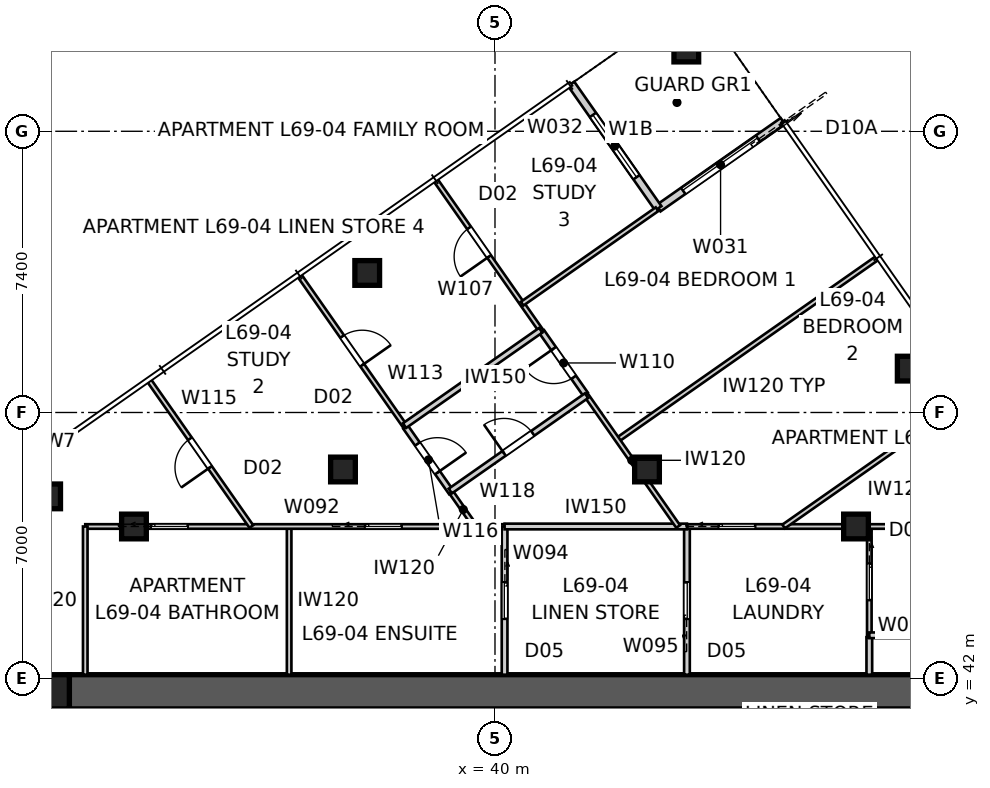
"""IFC4 building model, lengths in metres.
Left out: names, types, materials, properties, quantities, classifications, styles, units other than length and angle.
Written with IfcOpenShell. Run it as: python <this file> out.ifc"""

import sys

from ifc_helpers import new_model, si_unit, direction, frame, frame_2d, origin, origin_2d, place, context, subcontext, project, spatial, polyline, rectangle, outline, extrude, element, fill, save


model = new_model("IFC4")
c1 = context("Model", 3, precision=1e-05, world=origin(), true_north=direction((0.0, 1.0)))
c2 = subcontext(c1, "Body", "Model", "MODEL_VIEW")
j1 = project(units=[si_unit("LENGTHUNIT", "METRE"), si_unit("PLANEANGLEUNIT", "RADIAN")], contexts=[c1])
p1 = place(None, origin())
s1 = spatial("IfcSite", under=j1, at=p1, CompositionType="ELEMENT")
p2 = place(p1, origin())
s2 = spatial("IfcBuilding", under=s1, at=p2, CompositionType="ELEMENT")
p3 = place(p2, frame((0.0, 0.0, 250.6)))
s3 = spatial("IfcBuildingStorey", under=s2, at=p3, CompositionType="ELEMENT", Elevation=250.6)
p4 = place(p3, frame((28.8, 41.65, 0.0), z_axis=(0.0, 0.0, 1.0), x_axis=(1.0, 0.0, 0.0)))
e1 = element("IfcWall", 1, at=p4, inside=s3, PredefinedType="SHEAR", context=c2, shape_type="SweptSolid", body=[
    extrude(outline(polyline([(0.0, -0.45), (22.4, -0.45), (22.4, -0.025), (22.85, -0.025), (22.85, 0.025), (22.4, 0.025), (22.4, 0.45), (0.0, 0.45), (0.0, 0.025), (-0.45, 0.025), (-0.45, -0.025), (0.0, -0.025), (0.0, -0.45)])), origin(), (0.0, 0.0, 1.0), 3.4),
])
p5 = place(p3, frame((28.35, 41.2, 0.0), z_axis=(0.0, 0.0, 1.0), x_axis=(0.0, -1.0, 0.0)))
e2 = element("IfcWall", 2, at=p5, inside=s3, PredefinedType="SHEAR", context=c2, shape_type="SweptSolid", body=[
    extrude(outline(polyline([(0.0, -0.45), (22.4, -0.45), (22.4, -0.025), (22.85, -0.025), (22.85, 0.025), (22.4, 0.025), (22.4, 0.45), (0.0, 0.45), (0.0, 0.025), (-0.45, 0.025), (-0.45, -0.025), (0.0, -0.025), (0.0, -0.45)])), origin(), (0.0, 0.0, 1.0), 3.4),
])
p6 = place(p5, frame((11.14, 0.0, 0.0)))
e3 = element("IfcOpeningElement", 3, at=p6, cuts=e2, PredefinedType="OPENING", context=c2, shape_type="SweptSolid", body=[
    extrude(rectangle(XDim=1.02, YDim=2.4, at=frame_2d((0.51, 1.2))), frame((0.0, 0.46, 0.0), z_axis=(0.0, -1.0, 0.0), x_axis=(1.0, 0.0, 0.0)), (0.0, 0.0, 1.0), 0.92),
])
p7 = place(p3, frame((28.35, 41.65, 0.0), z_axis=(0.0, 0.0, 1.0), x_axis=(1.0, 0.0, 0.0)))
e4 = element("IfcColumn", 4, at=p7, inside=s3, PredefinedType="COLUMN", context=c2, shape_type="SweptSolid", body=[
    extrude(rectangle(XDim=0.9, YDim=0.9, at=origin_2d()), origin(), (0.0, 0.0, 1.0), 3.4),
])
for number, where, z_axis, x_axis in (
    (5, (50.914, 50.155, 0.0), (0.0, 0.0, 1.0), (1.0, 0.0, 0.0)),
    (6, (45.034, 58.551, 0.0), (0.0, 0.0, 1.0), (1.0, 0.0, 0.0)),
    (7, (36.638, 52.672, 0.0), (0.0, 0.0, 1.0), (1.0, 0.0, 0.0)),
    (8, (28.242, 46.793, 0.0), (0.0, 0.0, 1.0), (1.0, 0.0, 0.0)),
    (9, (49.5, 46.0, 0.0), (0.0, 0.0, 1.0), (1.0, 0.0, 0.0)),
    (10, (44.0, 47.5, 0.0), (0.0, 0.0, 1.0), (1.0, 0.0, 0.0)),
    (11, (36.0, 47.5, 0.0), (0.0, 0.0, 1.0), (1.0, 0.0, 0.0)),
    (12, (30.5, 46.0, 0.0), (0.0, 0.0, 1.0), (1.0, 0.0, 0.0)),
):
    element("IfcColumn", number, at=place(p3, frame(where, z_axis=z_axis, x_axis=x_axis)), inside=s3, PredefinedType="COLUMN", context=c2, shape_type="SweptSolid", body=[
        extrude(rectangle(XDim=0.65, YDim=0.65, at=origin_2d()), origin(), (0.0, 0.0, 1.0), 3.4),
    ])
p8 = place(p3, frame((47.574, 56.667, 0.0), z_axis=(0.0, 0.0, 1.0), x_axis=(-0.819165963305, -0.573556557423, 0.0)))
e13 = element("IfcWall", 13, at=p8, inside=s3, PredefinedType="SOLIDWALL", context=c2, shape_type="SweptSolid", body=[
    extrude(rectangle(XDim=4.0, YDim=0.2, at=frame_2d((2.0, 0.0))), origin(), (0.0, 0.0, 1.0), 3.25),
])
p9 = place(p8, frame((0.8, 0.0, 0.0)))
e14 = element("IfcOpeningElement", 14, at=p9, cuts=e13, PredefinedType="OPENING", context=c2, shape_type="SweptSolid", body=[
    extrude(rectangle(XDim=2.4, YDim=2.1, at=frame_2d((1.2, 1.05))), frame((0.0, 0.11, 0.0), z_axis=(0.0, -1.0, 0.0), x_axis=(1.0, 0.0, 0.0)), (0.0, 0.0, 1.0), 0.22),
])
p10 = place(p3, frame((44.298, 54.373, 0.0), z_axis=(0.0, 0.0, 1.0), x_axis=(-0.573597512525, 0.819137286189, 0.0)))
e15 = element("IfcWall", 15, at=p10, inside=s3, PredefinedType="SOLIDWALL", context=c2, shape_type="SweptSolid", body=[
    extrude(rectangle(XDim=4.0, YDim=0.2, at=frame_2d((2.0, 0.0))), origin(), (0.0, 0.0, 1.0), 3.25),
])
p11 = place(p10, frame((1.0, 0.0, 0.45)))
e16 = element("IfcOpeningElement", 16, at=p11, cuts=e15, PredefinedType="OPENING", context=c2, shape_type="SweptSolid", body=[
    extrude(rectangle(XDim=2.0, YDim=1.8, at=frame_2d((1.0, 0.9))), frame((0.0, 0.11, 0.0), z_axis=(0.0, -1.0, 0.0), x_axis=(1.0, 0.0, 0.0)), (0.0, 0.0, 1.0), 0.22),
])
p12 = place(p3, frame((34.583, 46.0, 0.0), z_axis=(0.0, 0.0, 1.0), x_axis=(0.0, -1.0, 0.0)))
e17 = element("IfcWall", 17, at=p12, inside=s3, PredefinedType="PARTITIONING", context=c2, shape_type="SweptSolid", body=[
    extrude(rectangle(XDim=3.9, YDim=0.12, at=frame_2d((1.95, 0.0))), origin(), (0.0, 0.0, 1.0), 3.25),
])
p13 = place(p3, frame((29.219, 46.0, 0.0), z_axis=(0.0, 0.0, 1.0), x_axis=(1.0, 0.0, 0.0)))
e18 = element("IfcWall", 18, at=p13, inside=s3, PredefinedType="PARTITIONING", context=c2, shape_type="SweptSolid", body=[
    extrude(rectangle(XDim=11.034, YDim=0.12, at=frame_2d((5.517, 0.0))), origin(), (0.0, 0.0, 1.0), 2.55),
])
p14 = place(p13, frame((1.735, 0.0, 0.0)))
e19 = element("IfcOpeningElement", 19, at=p14, cuts=e18, PredefinedType="OPENING", context=c2, shape_type="SweptSolid", body=[
    extrude(rectangle(XDim=0.96, YDim=2.1, at=frame_2d((0.48, 1.05))), frame((0.0, 0.07, 0.0), z_axis=(0.0, -1.0, 0.0), x_axis=(1.0, 0.0, 0.0)), (0.0, 0.0, 1.0), 0.14),
])
p15 = place(p13, frame((7.363, 0.0, 0.0)))
e20 = element("IfcOpeningElement", 20, at=p15, cuts=e18, PredefinedType="OPENING", context=c2, shape_type="SweptSolid", body=[
    extrude(rectangle(XDim=0.96, YDim=2.1, at=frame_2d((0.48, 1.05))), frame((0.0, 0.07, 0.0), z_axis=(0.0, -1.0, 0.0), x_axis=(1.0, 0.0, 0.0)), (0.0, 0.0, 1.0), 0.14),
])
p16 = place(p3, frame((29.219, 42.1, 0.0), z_axis=(0.0, 0.0, 1.0), x_axis=(0.0, 1.0, 0.0)))
e21 = element("IfcWall", 21, at=p16, inside=s3, PredefinedType="PARTITIONING", context=c2, shape_type="SweptSolid", body=[
    extrude(rectangle(XDim=3.9, YDim=0.12, at=frame_2d((1.95, 0.0))), origin(), (0.0, 0.0, 1.0), 3.25),
])
p17 = place(p3, frame((40.253, 46.0, 0.0), z_axis=(0.0, 0.0, 1.0), x_axis=(0.0, -1.0, 0.0)))
e22 = element("IfcWall", 22, at=p17, inside=s3, PredefinedType="SOLIDWALL", context=c2, shape_type="SweptSolid", body=[
    extrude(rectangle(XDim=3.9, YDim=0.15, at=frame_2d((1.95, 0.0))), origin(), (0.0, 0.0, 1.0), 3.25),
])
p18 = place(p17, frame((1.47, 0.0, 0.0)))
e23 = element("IfcOpeningElement", 23, at=p18, cuts=e22, PredefinedType="OPENING", context=c2, shape_type="SweptSolid", body=[
    extrude(rectangle(XDim=0.96, YDim=2.1, at=frame_2d((0.48, 1.05))), frame((0.0, 0.085, 0.0), z_axis=(0.0, -1.0, 0.0), x_axis=(1.0, 0.0, 0.0)), (0.0, 0.0, 1.0), 0.17),
])
p19 = place(p3, frame((45.051, 42.1, 0.0), z_axis=(0.0, 0.0, 1.0), x_axis=(0.0, 1.0, 0.0)))
e24 = element("IfcWall", 24, at=p19, inside=s3, PredefinedType="SOLIDWALL", context=c2, shape_type="SweptSolid", body=[
    extrude(rectangle(XDim=3.9, YDim=0.15, at=frame_2d((1.95, 0.0))), origin(), (0.0, 0.0, 1.0), 3.25),
])
p20 = place(p19, frame((1.47, 0.0, 0.0)))
e25 = element("IfcOpeningElement", 25, at=p20, cuts=e24, PredefinedType="OPENING", context=c2, shape_type="SweptSolid", body=[
    extrude(rectangle(XDim=0.96, YDim=2.1, at=frame_2d((0.48, 1.05))), frame((0.0, 0.085, 0.0), z_axis=(0.0, -1.0, 0.0), x_axis=(1.0, 0.0, 0.0)), (0.0, 0.0, 1.0), 0.17),
])
p21 = place(p3, frame((49.85, 46.0, 0.0), z_axis=(0.0, 0.0, 1.0), x_axis=(0.0, -1.0, 0.0)))
e26 = element("IfcWall", 26, at=p21, inside=s3, PredefinedType="PARTITIONING", context=c2, shape_type="SweptSolid", body=[
    extrude(rectangle(XDim=2.913, YDim=0.12, at=frame_2d((1.457, 0.0))), origin(), (0.0, 0.0, 1.0), 3.25),
])
p22 = place(p21, frame((0.977, 0.0, 0.0)))
e27 = element("IfcOpeningElement", 27, at=p22, cuts=e26, PredefinedType="OPENING", context=c2, shape_type="SweptSolid", body=[
    extrude(rectangle(XDim=0.96, YDim=2.1, at=frame_2d((0.48, 1.05))), frame((0.0, 0.07, 0.0), z_axis=(0.0, -1.0, 0.0), x_axis=(1.0, 0.0, 0.0)), (0.0, 0.0, 1.0), 0.14),
])
p23 = place(p3, frame((49.85, 43.087, 0.0), z_axis=(0.0, 0.0, 1.0), x_axis=(0.0, -1.0, 0.0)))
e28 = element("IfcWall", 28, at=p23, inside=s3, PredefinedType="SOLIDWALL", context=c2, shape_type="SweptSolid", body=[
    extrude(rectangle(XDim=0.987, YDim=0.15, at=frame_2d((0.493, 0.0))), origin(), (0.0, 0.0, 1.0), 3.25),
])
p24 = place(p3, frame((45.051, 46.0, 0.0), z_axis=(0.0, 0.0, 1.0), x_axis=(1.0, 0.0, 0.0)))
e29 = element("IfcWall", 29, at=p24, inside=s3, PredefinedType="PARTITIONING", context=c2, shape_type="SweptSolid", body=[
    extrude(rectangle(XDim=9.943, YDim=0.12, at=frame_2d((4.972, 0.0))), origin(), (0.0, 0.0, 1.0), 2.55),
])
p25 = place(p24, frame((0.835, 0.0, 0.0)))
e30 = element("IfcOpeningElement", 30, at=p25, cuts=e29, PredefinedType="OPENING", context=c2, shape_type="SweptSolid", body=[
    extrude(rectangle(XDim=0.96, YDim=2.1, at=frame_2d((0.48, 1.05))), frame((0.0, 0.07, 0.0), z_axis=(0.0, -1.0, 0.0), x_axis=(1.0, 0.0, 0.0)), (0.0, 0.0, 1.0), 0.14),
])
p26 = place(p24, frame((6.935, 0.0, 0.0)))
e31 = element("IfcOpeningElement", 31, at=p26, cuts=e29, PredefinedType="OPENING", context=c2, shape_type="SweptSolid", body=[
    extrude(rectangle(XDim=0.92, YDim=2.34, at=frame_2d((0.46, 1.17))), frame((0.0, 0.07, 0.0), z_axis=(0.0, -1.0, 0.0), x_axis=(1.0, 0.0, 0.0)), (0.0, 0.0, 1.0), 0.14),
])
p27 = place(p3, frame((40.253, 46.0, 0.0), z_axis=(0.0, 0.0, 1.0), x_axis=(1.0, 0.0, 0.0)))
e32 = element("IfcWall", 32, at=p27, inside=s3, PredefinedType="SOLIDWALL", context=c2, shape_type="SweptSolid", body=[
    extrude(rectangle(XDim=4.799, YDim=0.15, at=frame_2d((2.399, 0.0))), origin(), (0.0, 0.0, 1.0), 3.25),
])
p28 = place(p3, frame((56.0, 43.137, 0.0), z_axis=(0.0, 0.0, 1.0), x_axis=(-1.0, 0.0, 0.0)))
e33 = element("IfcWall", 33, at=p28, inside=s3, PredefinedType="SOLIDWALL", context=c2, shape_type="SweptSolid", body=[
    extrude(rectangle(XDim=6.15, YDim=0.15, at=frame_2d((3.075, 0.0))), origin(), (0.0, 0.0, 1.0), 3.25),
])
p29 = place(p28, frame((2.829, 0.0, 0.0)))
e34 = element("IfcOpeningElement", 34, at=p29, cuts=e33, PredefinedType="OPENING", context=c2, shape_type="SweptSolid", body=[
    extrude(rectangle(XDim=0.92, YDim=2.1, at=frame_2d((0.46, 1.05))), frame((0.0, 0.085, 0.0), z_axis=(0.0, -1.0, 0.0), x_axis=(1.0, 0.0, 0.0)), (0.0, 0.0, 1.0), 0.17),
])
p30 = place(p3, frame((50.051, 53.06, 0.0), z_axis=(0.0, 0.0, 1.0), x_axis=(-0.819152099525, -0.573576357466, 0.0)))
e35 = element("IfcWall", 35, at=p30, inside=s3, PredefinedType="PARTITIONING", context=c2, shape_type="SweptSolid", body=[
    extrude(rectangle(XDim=8.335, YDim=0.12, at=frame_2d((4.167, 0.0))), origin(), (0.0, 0.0, 1.0), 3.25),
])
p31 = place(p3, frame((41.232, 51.123, 0.0), z_axis=(0.0, 0.0, 1.0), x_axis=(-0.573586984922, 0.819144657999, 0.0)))
e36 = element("IfcWall", 36, at=p31, inside=s3, PredefinedType="PARTITIONING", context=c2, shape_type="SweptSolid", body=[
    extrude(rectangle(XDim=4.864, YDim=0.12, at=frame_2d((2.432, 0.0))), origin(), (0.0, 0.0, 1.0), 3.25),
])
p32 = place(p31, frame((2.419, 0.0, 0.0)))
e37 = element("IfcOpeningElement", 37, at=p32, cuts=e36, PredefinedType="OPENING", context=c2, shape_type="SweptSolid", body=[
    extrude(rectangle(XDim=0.92, YDim=2.34, at=frame_2d((0.46, 1.17))), frame((0.0, 0.07, 0.0), z_axis=(0.0, -1.0, 0.0), x_axis=(1.0, 0.0, 0.0)), (0.0, 0.0, 1.0), 0.14),
])
p33 = place(p3, frame((44.819, 46.0, 0.0), z_axis=(0.0, 0.0, 1.0), x_axis=(-0.573566368211, 0.819159093985, 0.0)))
e38 = element("IfcWall", 38, at=p33, inside=s3, PredefinedType="PARTITIONING", context=c2, shape_type="SweptSolid", body=[
    extrude(rectangle(XDim=4.253, YDim=0.12, at=frame_2d((2.126, 0.0))), origin(), (0.0, 0.0, 1.0), 3.25),
])
p34 = place(p3, frame((40.714, 51.863, 0.0), z_axis=(0.0, 0.0, 1.0), x_axis=(0.819139307094, 0.573594626521, 0.0)))
e39 = element("IfcWall", 39, at=p34, inside=s3, PredefinedType="PARTITIONING", context=c2, shape_type="SweptSolid", body=[
    extrude(rectangle(XDim=4.335, YDim=0.12, at=frame_2d((2.167, 0.0))), origin(), (0.0, 0.0, 1.0), 3.25),
])
p35 = place(p3, frame((42.38, 49.484, 0.0), z_axis=(0.0, 0.0, 1.0), x_axis=(-0.573585144111, 0.819145946981, 0.0)))
e40 = element("IfcWall", 40, at=p35, inside=s3, PredefinedType="SOLIDWALL", context=c2, shape_type="SweptSolid", body=[
    extrude(rectangle(XDim=2.001, YDim=0.15, at=frame_2d((1.001, 0.0))), origin(), (0.0, 0.0, 1.0), 3.25),
])
p36 = place(p35, frame((0.541, 0.0, 0.0)))
e41 = element("IfcOpeningElement", 41, at=p36, cuts=e40, PredefinedType="OPENING", context=c2, shape_type="SweptSolid", body=[
    extrude(rectangle(XDim=0.92, YDim=2.34, at=frame_2d((0.46, 1.17))), frame((0.0, 0.085, 0.0), z_axis=(0.0, -1.0, 0.0), x_axis=(1.0, 0.0, 0.0)), (0.0, 0.0, 1.0), 0.17),
])
p37 = place(p3, frame((52.56, 49.477, 0.0), z_axis=(0.0, 0.0, 1.0), x_axis=(-0.81915432861, -0.573573173989, 0.0)))
e42 = element("IfcWall", 42, at=p37, inside=s3, PredefinedType="PARTITIONING", context=c2, shape_type="SweptSolid", body=[
    extrude(rectangle(XDim=6.061, YDim=0.12, at=frame_2d((3.031, 0.0))), origin(), (0.0, 0.0, 1.0), 3.25),
])
p38 = place(p3, frame((34.859, 52.598, 0.0), z_axis=(0.0, 0.0, 1.0), x_axis=(0.573586984922, -0.819144657999, 0.0)))
e43 = element("IfcWall", 43, at=p38, inside=s3, PredefinedType="PARTITIONING", context=c2, shape_type="SweptSolid", body=[
    extrude(rectangle(XDim=4.864, YDim=0.12, at=frame_2d((2.432, 0.0))), origin(), (0.0, 0.0, 1.0), 3.25),
])
p39 = place(p38, frame((1.952, 0.0, 0.0)))
e44 = element("IfcOpeningElement", 44, at=p39, cuts=e43, PredefinedType="OPENING", context=c2, shape_type="SweptSolid", body=[
    extrude(rectangle(XDim=0.92, YDim=2.34, at=frame_2d((0.46, 1.17))), frame((0.0, 0.07, 0.0), z_axis=(0.0, -1.0, 0.0), x_axis=(1.0, 0.0, 0.0)), (0.0, 0.0, 1.0), 0.14),
])
p40 = place(p3, frame((38.854, 46.892, 0.0), z_axis=(0.0, 0.0, 1.0), x_axis=(0.57368792347, -0.81907396886, 0.0)))
e45 = element("IfcWall", 45, at=p40, inside=s3, PredefinedType="PARTITIONING", context=c2, shape_type="SweptSolid", body=[
    extrude(rectangle(XDim=1.089, YDim=0.12, at=frame_2d((0.545, 0.0))), origin(), (0.0, 0.0, 1.0), 3.25),
])
p41 = place(p3, frame((33.588, 46.0, 0.0), z_axis=(0.0, 0.0, 1.0), x_axis=(-0.57355695423, 0.819165685472, 0.0)))
e46 = element("IfcWall", 46, at=p41, inside=s3, PredefinedType="PARTITIONING", context=c2, shape_type="SweptSolid", body=[
    extrude(rectangle(XDim=4.676, YDim=0.12, at=frame_2d((2.338, 0.0))), origin(), (0.0, 0.0, 1.0), 3.25),
])
p42 = place(p41, frame((1.898, 0.0, 0.0)))
e47 = element("IfcOpeningElement", 47, at=p42, cuts=e46, PredefinedType="OPENING", context=c2, shape_type="SweptSolid", body=[
    extrude(rectangle(XDim=0.92, YDim=2.34, at=frame_2d((0.46, 1.17))), frame((0.0, 0.07, 0.0), z_axis=(0.0, -1.0, 0.0), x_axis=(1.0, 0.0, 0.0)), (0.0, 0.0, 1.0), 0.14),
])
p43 = place(p3, frame((37.648, 48.614, 0.0), z_axis=(0.0, 0.0, 1.0), x_axis=(0.573485736943, -0.819215545216, 0.0)))
e48 = element("IfcWall", 48, at=p43, inside=s3, PredefinedType="SOLIDWALL", context=c2, shape_type="SweptSolid", body=[
    extrude(rectangle(XDim=2.101, YDim=0.15, at=frame_2d((1.051, 0.0))), origin(), (0.0, 0.0, 1.0), 3.25),
])
p44 = place(p43, frame((0.541, 0.0, 0.0)))
e49 = element("IfcOpeningElement", 49, at=p44, cuts=e48, PredefinedType="OPENING", context=c2, shape_type="SweptSolid", body=[
    extrude(rectangle(XDim=0.92, YDim=2.34, at=frame_2d((0.46, 1.17))), frame((0.0, 0.085, 0.0), z_axis=(0.0, -1.0, 0.0), x_axis=(1.0, 0.0, 0.0)), (0.0, 0.0, 1.0), 0.17),
])
p45 = place(p3, frame((41.203, 51.164, 0.0), z_axis=(0.0, 0.0, 1.0), x_axis=(-0.81916112811, -0.573563463091, 0.0)))
e50 = element("IfcWall", 50, at=p45, inside=s3, PredefinedType="SOLIDWALL", context=c2, shape_type="SweptSolid", body=[
    extrude(rectangle(XDim=4.375, YDim=0.15, at=frame_2d((2.188, 0.0))), origin(), (0.0, 0.0, 1.0), 3.25),
])
p46 = place(p3, frame((38.825, 46.933, 0.0), z_axis=(0.0, 0.0, 1.0), x_axis=(0.81916112811, 0.573563463091, 0.0)))
e51 = element("IfcWall", 51, at=p46, inside=s3, PredefinedType="SOLIDWALL", context=c2, shape_type="SweptSolid", body=[
    extrude(rectangle(XDim=4.375, YDim=0.15, at=frame_2d((2.188, 0.0))), origin(), (0.0, 0.0, 1.0), 3.25),
])
p47 = place(p46, frame((1.728, 0.0, 0.0)))
e52 = element("IfcOpeningElement", 52, at=p47, cuts=e51, PredefinedType="OPENING", context=c2, shape_type="SweptSolid", body=[
    extrude(rectangle(XDim=0.92, YDim=2.34, at=frame_2d((0.46, 1.17))), frame((0.0, 0.085, 0.0), z_axis=(0.0, -1.0, 0.0), x_axis=(1.0, 0.0, 0.0)), (0.0, 0.0, 1.0), 0.17),
])
p48 = place(p3, frame((27.9, 41.619, 0.0), z_axis=(0.0, 0.0, 1.0), x_axis=(0.999397924003, 0.034695669724, 0.0)))
e53 = element("IfcWall", 53, at=p48, inside=s3, PredefinedType="PARTITIONING", context=c2, shape_type="SweptSolid", body=[
    extrude(rectangle(XDim=0.901, YDim=0.12, at=frame_2d((0.45, 0.0))), origin(), (0.0, 0.0, 1.0), 3.25),
])
p49 = place(p9, origin())
e54 = element("IfcDoor", 54, at=p49, inside=s3, OperationType="SLIDING_TO_LEFT", PredefinedType="DOOR", context=c2, shape_type="SweptSolid", body=[
    extrude(rectangle(XDim=2.4, YDim=2.1, at=frame_2d((1.2, 1.05))), frame((0.0, 0.025, 0.0), z_axis=(0.0, -1.0, 0.0), x_axis=(1.0, 0.0, 0.0)), (0.0, 0.0, 1.0), 0.05),
])
fill(e14, e54)
p50 = place(p11, origin())
e55 = element("IfcWindow", 55, at=p50, inside=s3, PartitioningType="SINGLE_PANEL", PredefinedType="WINDOW", context=c2, shape_type="SweptSolid", body=[
    extrude(rectangle(XDim=2.0, YDim=1.8, at=frame_2d((1.0, 0.9))), frame((0.0, 0.03, 0.0), z_axis=(0.0, -1.0, 0.0), x_axis=(1.0, 0.0, 0.0)), (0.0, 0.0, 1.0), 0.06),
])
fill(e16, e55)
p51 = place(p42, origin())
e56 = element("IfcDoor", 56, at=p51, inside=s3, OperationType="SINGLE_SWING_LEFT", PredefinedType="DOOR", context=c2, shape_type="SweptSolid", body=[
    extrude(rectangle(XDim=0.92, YDim=2.34, at=frame_2d((0.46, 1.17))), frame((0.0, 0.025, 0.0), z_axis=(0.0, -1.0, 0.0), x_axis=(1.0, 0.0, 0.0)), (0.0, 0.0, 1.0), 0.05),
])
fill(e47, e56)
p52 = place(p14, origin())
e57 = element("IfcDoor", 57, at=p52, inside=s3, OperationType="SLIDING_TO_LEFT", PredefinedType="DOOR", context=c2, shape_type="SweptSolid", body=[
    extrude(rectangle(XDim=0.96, YDim=2.1, at=frame_2d((0.48, 1.05))), frame((0.0, 0.025, 0.0), z_axis=(0.0, -1.0, 0.0), x_axis=(1.0, 0.0, 0.0)), (0.0, 0.0, 1.0), 0.05),
])
fill(e19, e57)
p53 = place(p15, origin())
e58 = element("IfcDoor", 58, at=p53, inside=s3, OperationType="SLIDING_TO_LEFT", PredefinedType="DOOR", context=c2, shape_type="SweptSolid", body=[
    extrude(rectangle(XDim=0.96, YDim=2.1, at=frame_2d((0.48, 1.05))), frame((0.0, 0.025, 0.0), z_axis=(0.0, -1.0, 0.0), x_axis=(1.0, 0.0, 0.0)), (0.0, 0.0, 1.0), 0.05),
])
fill(e20, e58)
p54 = place(p39, origin())
e59 = element("IfcDoor", 59, at=p54, inside=s3, OperationType="SINGLE_SWING_RIGHT", PredefinedType="DOOR", context=c2, shape_type="SweptSolid", body=[
    extrude(rectangle(XDim=0.92, YDim=2.34, at=frame_2d((0.46, 1.17))), frame((0.0, 0.025, 0.0), z_axis=(0.0, -1.0, 0.0), x_axis=(1.0, 0.0, 0.0)), (0.0, 0.0, 1.0), 0.05),
])
fill(e44, e59)
p55 = place(p44, origin())
e60 = element("IfcDoor", 60, at=p55, inside=s3, OperationType="SINGLE_SWING_RIGHT", PredefinedType="DOOR", context=c2, shape_type="SweptSolid", body=[
    extrude(rectangle(XDim=0.92, YDim=2.34, at=frame_2d((0.46, 1.17))), frame((0.0, 0.025, 0.0), z_axis=(0.0, -1.0, 0.0), x_axis=(1.0, 0.0, 0.0)), (0.0, 0.0, 1.0), 0.05),
])
fill(e49, e60)
p56 = place(p18, origin())
e61 = element("IfcDoor", 61, at=p56, inside=s3, OperationType="SLIDING_TO_LEFT", PredefinedType="DOOR", context=c2, shape_type="SweptSolid", body=[
    extrude(rectangle(XDim=0.96, YDim=2.1, at=frame_2d((0.48, 1.05))), frame((0.0, 0.025, 0.0), z_axis=(0.0, -1.0, 0.0), x_axis=(1.0, 0.0, 0.0)), (0.0, 0.0, 1.0), 0.05),
])
fill(e23, e61)
p57 = place(p32, origin())
e62 = element("IfcDoor", 62, at=p57, inside=s3, OperationType="SINGLE_SWING_LEFT", PredefinedType="DOOR", context=c2, shape_type="SweptSolid", body=[
    extrude(rectangle(XDim=0.92, YDim=2.34, at=frame_2d((0.46, 1.17))), frame((0.0, 0.025, 0.0), z_axis=(0.0, -1.0, 0.0), x_axis=(1.0, 0.0, 0.0)), (0.0, 0.0, 1.0), 0.05),
])
fill(e37, e62)
p58 = place(p47, origin())
e63 = element("IfcDoor", 63, at=p58, inside=s3, OperationType="SINGLE_SWING_LEFT", PredefinedType="DOOR", context=c2, shape_type="SweptSolid", body=[
    extrude(rectangle(XDim=0.92, YDim=2.34, at=frame_2d((0.46, 1.17))), frame((0.0, 0.025, 0.0), z_axis=(0.0, -1.0, 0.0), x_axis=(1.0, 0.0, 0.0)), (0.0, 0.0, 1.0), 0.05),
])
fill(e52, e63)
p59 = place(p36, origin())
e64 = element("IfcDoor", 64, at=p59, inside=s3, OperationType="SINGLE_SWING_RIGHT", PredefinedType="DOOR", context=c2, shape_type="SweptSolid", body=[
    extrude(rectangle(XDim=0.92, YDim=2.34, at=frame_2d((0.46, 1.17))), frame((0.0, 0.025, 0.0), z_axis=(0.0, -1.0, 0.0), x_axis=(1.0, 0.0, 0.0)), (0.0, 0.0, 1.0), 0.05),
])
fill(e41, e64)
p60 = place(p20, origin())
e65 = element("IfcDoor", 65, at=p60, inside=s3, OperationType="SLIDING_TO_LEFT", PredefinedType="DOOR", context=c2, shape_type="SweptSolid", body=[
    extrude(rectangle(XDim=0.96, YDim=2.1, at=frame_2d((0.48, 1.05))), frame((0.0, 0.025, 0.0), z_axis=(0.0, -1.0, 0.0), x_axis=(1.0, 0.0, 0.0)), (0.0, 0.0, 1.0), 0.05),
])
fill(e25, e65)
p61 = place(p22, origin())
e66 = element("IfcDoor", 66, at=p61, inside=s3, OperationType="SLIDING_TO_LEFT", PredefinedType="DOOR", context=c2, shape_type="SweptSolid", body=[
    extrude(rectangle(XDim=0.96, YDim=2.1, at=frame_2d((0.48, 1.05))), frame((0.0, 0.025, 0.0), z_axis=(0.0, -1.0, 0.0), x_axis=(1.0, 0.0, 0.0)), (0.0, 0.0, 1.0), 0.05),
])
fill(e27, e66)
p62 = place(p25, origin())
e67 = element("IfcDoor", 67, at=p62, inside=s3, OperationType="SLIDING_TO_LEFT", PredefinedType="DOOR", context=c2, shape_type="SweptSolid", body=[
    extrude(rectangle(XDim=0.96, YDim=2.1, at=frame_2d((0.48, 1.05))), frame((0.0, 0.025, 0.0), z_axis=(0.0, -1.0, 0.0), x_axis=(1.0, 0.0, 0.0)), (0.0, 0.0, 1.0), 0.05),
])
fill(e30, e67)
save(model, sys.argv[1])
